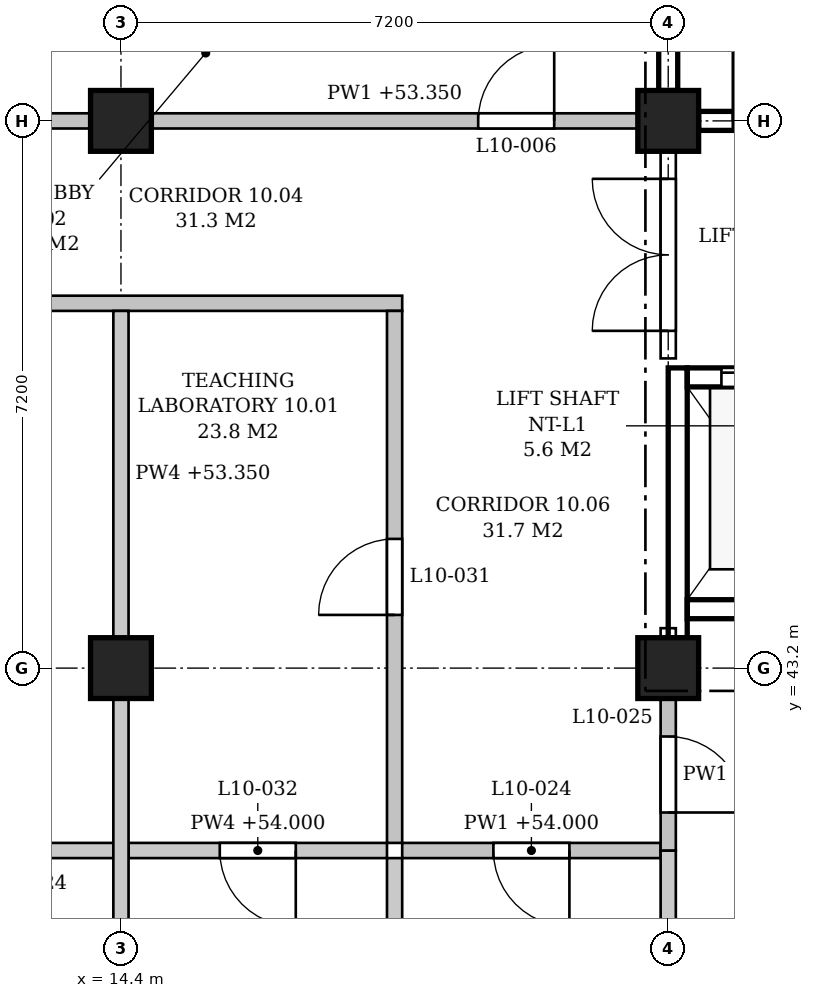
"""IFC4 building model, lengths in metres.
Left out: names, types, materials, properties, quantities, classifications, styles, units other than length and angle.
Written with IfcOpenShell. Run it as: python <this file> out.ifc"""

import sys

from ifc_helpers import new_model, si_unit, direction, frame, frame_2d, origin, origin_2d, place, context, subcontext, project, spatial, polyline, rectangle, outline, extrude, element, fill, save


model = new_model("IFC4")
c1 = context("Model", 3, precision=1e-05, world=origin(), true_north=direction((0.0, 1.0)))
c2 = subcontext(c1, "Body", "Model", "MODEL_VIEW")
j1 = project(units=[si_unit("LENGTHUNIT", "METRE"), si_unit("PLANEANGLEUNIT", "RADIAN")], contexts=[c1])
p1 = place(None, origin())
s1 = spatial("IfcSite", under=j1, at=p1, CompositionType="ELEMENT")
p2 = place(p1, origin())
s2 = spatial("IfcBuilding", under=s1, at=p2, CompositionType="ELEMENT")
p3 = place(p2, frame((0.0, 0.0, 49.8)))
s3 = spatial("IfcBuildingStorey", under=s2, at=p3, CompositionType="ELEMENT", Elevation=49.8)
for number, where, z_axis, x_axis in (
    (1, (14.4, 43.2, 0.0), (0.0, 0.0, 1.0), (1.0, 0.0, 0.0)),
    (2, (14.4, 50.4, 0.0), (0.0, 0.0, 1.0), (1.0, 0.0, 0.0)),
    (3, (21.6, 43.2, 0.0), (0.0, 0.0, 1.0), (1.0, 0.0, 0.0)),
    (4, (21.6, 50.4, 0.0), (0.0, 0.0, 1.0), (1.0, 0.0, 0.0)),
):
    element("IfcColumn", number, at=place(p3, frame(where, z_axis=z_axis, x_axis=x_axis)), inside=s3, PredefinedType="COLUMN", context=c2, shape_type="SweptSolid", body=[
        extrude(rectangle(XDim=0.8, YDim=0.8, at=origin_2d()), origin(), (0.0, 0.0, 1.0), 4.5),
    ])
p4 = place(p3, frame((22.0, 50.4, 0.0), z_axis=(0.0, 0.0, 1.0), x_axis=(1.0, 0.0, 0.0)))
e5 = element("IfcWall", 5, at=p4, inside=s3, PredefinedType="SHEAR", context=c2, shape_type="SweptSolid", body=[
    extrude(rectangle(XDim=6.4, YDim=0.25, at=frame_2d((3.2, 0.0))), origin(), (0.0, 0.0, 1.0), 3.55),
])
p5 = place(p4, frame((0.45, 0.0, 0.0)))
e6 = element("IfcOpeningElement", 6, at=p5, cuts=e5, PredefinedType="OPENING", context=c2, shape_type="SweptSolid", body=[
    extrude(rectangle(XDim=1.1, YDim=2.1, at=frame_2d((0.55, 1.05))), frame((0.0, 0.135, 0.0), z_axis=(0.0, -1.0, 0.0), x_axis=(1.0, 0.0, 0.0)), (0.0, 0.0, 1.0), 0.27),
])
p6 = place(p3, frame((21.6, 50.8, 0.0), z_axis=(0.0, 0.0, 1.0), x_axis=(0.0, 1.0, 0.0)))
e7 = element("IfcWall", 7, at=p6, inside=s3, PredefinedType="SHEAR", context=c2, shape_type="SweptSolid", body=[
    extrude(rectangle(XDim=6.4, YDim=0.25, at=frame_2d((3.2, 0.0))), origin(), (0.0, 0.0, 1.0), 3.55),
])
p7 = place(p3, frame((21.725, 43.6, -0.25), z_axis=(0.0, 0.0, 1.0), x_axis=(0.0, 1.0, 0.0)))
e8 = element("IfcWall", 8, at=p7, inside=s3, PredefinedType="SHEAR", context=c2, shape_type="SweptSolid", body=[
    extrude(rectangle(XDim=3.55, YDim=0.25, at=frame_2d((1.775, 0.0))), origin(), (0.0, 0.0, 1.0), 3.8),
])
p8 = place(p3, frame((21.85, 47.025, -0.25), z_axis=(0.0, 0.0, 1.0), x_axis=(1.0, 0.0, 0.0)))
e9 = element("IfcWall", 9, at=p8, inside=s3, PredefinedType="SHEAR", context=c2, shape_type="SweptSolid", body=[
    extrude(rectangle(XDim=2.0, YDim=0.25, at=frame_2d((1.0, 0.0))), origin(), (0.0, 0.0, 1.0), 4.45),
])
p9 = place(p8, frame((0.45, 0.0, 0.25)))
e10 = element("IfcOpeningElement", 10, at=p9, cuts=e9, PredefinedType="OPENING", context=c2, shape_type="SweptSolid", body=[
    extrude(rectangle(XDim=1.1, YDim=2.1, at=frame_2d((0.55, 1.05))), frame((0.0, 0.135, 0.0), z_axis=(0.0, -1.0, 0.0), x_axis=(1.0, 0.0, 0.0)), (0.0, 0.0, 1.0), 0.27),
])
p10 = place(p3, frame((21.85, 43.975, -0.25), z_axis=(0.0, 0.0, 1.0), x_axis=(1.0, 0.0, 0.0)))
e11 = element("IfcWall", 11, at=p10, inside=s3, PredefinedType="SHEAR", context=c2, shape_type="SweptSolid", body=[
    extrude(rectangle(XDim=2.0, YDim=0.25, at=frame_2d((1.0, 0.0))), origin(), (0.0, 0.0, 1.0), 4.45),
])
p11 = place(p3, frame((3.7, 40.8, 0.0), z_axis=(0.0, 0.0, 1.0), x_axis=(1.0, 0.0, 0.0)))
e12 = element("IfcWall", 12, at=p11, inside=s3, PredefinedType="PARTITIONING", context=c2, shape_type="SweptSolid", body=[
    extrude(outline(polyline([(0.0, 0.0), (10.6, 0.0), (10.6, 3.55), (10.475, 3.55), (10.475, 4.2), (3.725, 4.2), (3.725, 3.55), (3.275, 3.55), (3.275, 4.2), (0.0, 4.2), (0.0, 0.0)])), frame((0.0, 0.1, 0.0), z_axis=(0.0, -1.0, 0.0), x_axis=(1.0, 0.0, 0.0)), (0.0, 0.0, 1.0), 0.2),
])
p12 = place(p11, frame((1.25, 0.0, 0.0)))
e13 = element("IfcOpeningElement", 13, at=p12, cuts=e12, PredefinedType="OPENING", context=c2, shape_type="SweptSolid", body=[
    extrude(rectangle(XDim=1.0, YDim=2.1, at=frame_2d((0.5, 1.05))), frame((0.0, 0.11, 0.0), z_axis=(0.0, -1.0, 0.0), x_axis=(1.0, 0.0, 0.0)), (0.0, 0.0, 1.0), 0.22),
])
p13 = place(p11, frame((6.55, 0.0, 0.0)))
e14 = element("IfcOpeningElement", 14, at=p13, cuts=e12, PredefinedType="OPENING", context=c2, shape_type="SweptSolid", body=[
    extrude(rectangle(XDim=1.0, YDim=2.1, at=frame_2d((0.5, 1.05))), frame((0.0, 0.11, 0.0), z_axis=(0.0, -1.0, 0.0), x_axis=(1.0, 0.0, 0.0)), (0.0, 0.0, 1.0), 0.22),
])
p14 = place(p3, frame((14.5, 40.8, 0.0), z_axis=(0.0, 0.0, 1.0), x_axis=(1.0, 0.0, 0.0)))
e15 = element("IfcWall", 15, at=p14, inside=s3, PredefinedType="PARTITIONING", context=c2, shape_type="SweptSolid", body=[
    extrude(outline(polyline([(0.0, 0.0), (3.4, 0.0), (3.4, 4.2), (0.125, 4.2), (0.125, 3.55), (0.0, 3.55), (0.0, 0.0)])), frame((0.0, 0.1, 0.0), z_axis=(0.0, -1.0, 0.0), x_axis=(1.0, 0.0, 0.0)), (0.0, 0.0, 1.0), 0.2),
])
p15 = place(p14, frame((1.2, 0.0, 0.0)))
e16 = element("IfcOpeningElement", 16, at=p15, cuts=e15, PredefinedType="OPENING", context=c2, shape_type="SweptSolid", body=[
    extrude(rectangle(XDim=1.0, YDim=2.1, at=frame_2d((0.5, 1.05))), frame((0.0, 0.11, 0.0), z_axis=(0.0, -1.0, 0.0), x_axis=(1.0, 0.0, 0.0)), (0.0, 0.0, 1.0), 0.22),
])
p16 = place(p3, frame((18.1, 40.8, 0.0), z_axis=(0.0, 0.0, 1.0), x_axis=(1.0, 0.0, 0.0)))
e17 = element("IfcWall", 17, at=p16, inside=s3, PredefinedType="PARTITIONING", context=c2, shape_type="SweptSolid", body=[
    extrude(outline(polyline([(0.0, 0.0), (3.4, 0.0), (3.4, 3.55), (3.275, 3.55), (3.275, 4.2), (0.0, 4.2), (0.0, 0.0)])), frame((0.0, 0.1, 0.0), z_axis=(0.0, -1.0, 0.0), x_axis=(1.0, 0.0, 0.0)), (0.0, 0.0, 1.0), 0.2),
])
p17 = place(p16, frame((1.2, 0.0, 0.0)))
e18 = element("IfcOpeningElement", 18, at=p17, cuts=e17, PredefinedType="OPENING", context=c2, shape_type="SweptSolid", body=[
    extrude(rectangle(XDim=1.0, YDim=2.1, at=frame_2d((0.5, 1.05))), frame((0.0, 0.11, 0.0), z_axis=(0.0, -1.0, 0.0), x_axis=(1.0, 0.0, 0.0)), (0.0, 0.0, 1.0), 0.22),
])
p18 = place(p3, frame((3.5, 48.0, 0.0), z_axis=(0.0, 0.0, 1.0), x_axis=(1.0, 0.0, 0.0)))
e19 = element("IfcWall", 19, at=p18, inside=s3, PredefinedType="PARTITIONING", context=c2, shape_type="SweptSolid", body=[
    extrude(outline(polyline([(0.0, 0.0), (14.6, 0.0), (14.6, 4.2), (11.125, 4.2), (11.125, 3.55), (10.675, 3.55), (10.675, 4.2), (3.925, 4.2), (3.925, 3.55), (3.475, 3.55), (3.475, 4.2), (0.0, 4.2), (0.0, 0.0)])), frame((0.0, 0.1, 0.0), z_axis=(0.0, -1.0, 0.0), x_axis=(1.0, 0.0, 0.0)), (0.0, 0.0, 1.0), 0.2),
])
p19 = place(p18, frame((5.0, 0.0, 0.0)))
e20 = element("IfcOpeningElement", 20, at=p19, cuts=e19, PredefinedType="OPENING", context=c2, shape_type="SweptSolid", body=[
    extrude(rectangle(XDim=1.0, YDim=2.1, at=frame_2d((0.5, 1.05))), frame((0.0, 0.11, 0.0), z_axis=(0.0, -1.0, 0.0), x_axis=(1.0, 0.0, 0.0)), (0.0, 0.0, 1.0), 0.22),
])
p20 = place(p3, frame((7.6, 50.4, 0.0), z_axis=(0.0, 0.0, 1.0), x_axis=(1.0, 0.0, 0.0)))
e21 = element("IfcWall", 21, at=p20, inside=s3, PredefinedType="PARTITIONING", context=c2, shape_type="SweptSolid", body=[
    extrude(rectangle(XDim=6.4, YDim=0.2, at=frame_2d((3.2, 0.0))), origin(), (0.0, 0.0, 1.0), 3.55),
])
p21 = place(p20, frame((2.7, 0.0, 0.0)))
e22 = element("IfcOpeningElement", 22, at=p21, cuts=e21, PredefinedType="OPENING", context=c2, shape_type="SweptSolid", body=[
    extrude(rectangle(XDim=1.0, YDim=2.1, at=frame_2d((0.5, 1.05))), frame((0.0, 0.11, 0.0), z_axis=(0.0, -1.0, 0.0), x_axis=(1.0, 0.0, 0.0)), (0.0, 0.0, 1.0), 0.22),
])
p22 = place(p3, frame((14.8, 50.4, 0.0), z_axis=(0.0, 0.0, 1.0), x_axis=(1.0, 0.0, 0.0)))
e23 = element("IfcWall", 23, at=p22, inside=s3, PredefinedType="PARTITIONING", context=c2, shape_type="SweptSolid", body=[
    extrude(rectangle(XDim=6.4, YDim=0.2, at=frame_2d((3.2, 0.0))), origin(), (0.0, 0.0, 1.0), 3.55),
])
p23 = place(p22, frame((4.3, 0.0, 0.0)))
e24 = element("IfcOpeningElement", 24, at=p23, cuts=e23, PredefinedType="OPENING", context=c2, shape_type="SweptSolid", body=[
    extrude(rectangle(XDim=1.0, YDim=2.1, at=frame_2d((0.5, 1.05))), frame((0.0, 0.11, 0.0), z_axis=(0.0, -1.0, 0.0), x_axis=(1.0, 0.0, 0.0)), (0.0, 0.0, 1.0), 0.22),
])
p24 = place(p3, frame((14.4, 36.4, 0.0), z_axis=(0.0, 0.0, 1.0), x_axis=(0.0, 1.0, 0.0)))
e25 = element("IfcWall", 25, at=p24, inside=s3, PredefinedType="PARTITIONING", context=c2, shape_type="SweptSolid", body=[
    extrude(rectangle(XDim=6.4, YDim=0.2, at=frame_2d((3.2, 0.0))), origin(), (0.0, 0.0, 1.0), 3.55),
])
p25 = place(p3, frame((14.4, 43.6, 0.0), z_axis=(0.0, 0.0, 1.0), x_axis=(0.0, 1.0, 0.0)))
e26 = element("IfcWall", 26, at=p25, inside=s3, PredefinedType="PARTITIONING", context=c2, shape_type="SweptSolid", body=[
    extrude(rectangle(XDim=4.3, YDim=0.2, at=frame_2d((2.15, 0.0))), origin(), (0.0, 0.0, 1.0), 3.55),
])
p26 = place(p3, frame((18.0, 36.15, 0.0), z_axis=(0.0, 0.0, 1.0), x_axis=(0.0, 1.0, 0.0)))
e27 = element("IfcWall", 27, at=p26, inside=s3, PredefinedType="PARTITIONING", context=c2, shape_type="SweptSolid", body=[
    extrude(outline(polyline([(0.0, 0.0), (4.55, 0.0), (4.55, 4.2), (0.05, 4.2), (0.05, 3.6), (0.0, 3.6), (0.0, 0.0)])), frame((0.0, 0.1, 0.0), z_axis=(0.0, -1.0, 0.0), x_axis=(1.0, 0.0, 0.0)), (0.0, 0.0, 1.0), 0.2),
])
p27 = place(p3, frame((18.0, 40.9, 0.0), z_axis=(0.0, 0.0, 1.0), x_axis=(0.0, 1.0, 0.0)))
e28 = element("IfcWall", 28, at=p27, inside=s3, PredefinedType="PARTITIONING", context=c2, shape_type="SweptSolid", body=[
    extrude(outline(polyline([(0.0, 0.0), (7.0, 0.0), (7.0, 4.2), (2.525, 4.2), (2.525, 3.55), (2.075, 3.55), (2.075, 4.2), (0.0, 4.2), (0.0, 0.0)])), frame((0.0, 0.1, 0.0), z_axis=(0.0, -1.0, 0.0), x_axis=(1.0, 0.0, 0.0)), (0.0, 0.0, 1.0), 0.2),
])
p28 = place(p27, frame((3.0, 0.0, 0.0)))
e29 = element("IfcOpeningElement", 29, at=p28, cuts=e28, PredefinedType="OPENING", context=c2, shape_type="SweptSolid", body=[
    extrude(rectangle(XDim=1.0, YDim=2.1, at=frame_2d((0.5, 1.05))), frame((0.0, 0.11, 0.0), z_axis=(0.0, -1.0, 0.0), x_axis=(1.0, 0.0, 0.0)), (0.0, 0.0, 1.0), 0.22),
])
p29 = place(p3, frame((21.6, 36.4, 0.0), z_axis=(0.0, 0.0, 1.0), x_axis=(0.0, 1.0, 0.0)))
e30 = element("IfcWall", 30, at=p29, inside=s3, PredefinedType="PARTITIONING", context=c2, shape_type="SweptSolid", body=[
    extrude(rectangle(XDim=4.4, YDim=0.2, at=frame_2d((2.2, 0.0))), origin(), (0.0, 0.0, 1.0), 3.55),
])
p30 = place(p3, frame((21.6, 40.8, 0.0), z_axis=(0.0, 0.0, 1.0), x_axis=(0.0, 1.0, 0.0)))
e31 = element("IfcWall", 31, at=p30, inside=s3, PredefinedType="PARTITIONING", context=c2, shape_type="SweptSolid", body=[
    extrude(rectangle(XDim=2.0, YDim=0.2, at=frame_2d((1.0, 0.0))), origin(), (0.0, 0.0, 1.0), 3.55),
])
p31 = place(p30, frame((0.5, 0.0, 0.0)))
e32 = element("IfcOpeningElement", 32, at=p31, cuts=e31, PredefinedType="OPENING", context=c2, shape_type="SweptSolid", body=[
    extrude(rectangle(XDim=1.0, YDim=2.1, at=frame_2d((0.5, 1.05))), frame((0.0, 0.11, 0.0), z_axis=(0.0, -1.0, 0.0), x_axis=(1.0, 0.0, 0.0)), (0.0, 0.0, 1.0), 0.22),
])
p32 = place(p3, frame((21.6, 43.6, 0.0), z_axis=(0.0, 0.0, 1.0), x_axis=(0.0, 1.0, 0.0)))
e33 = element("IfcWall", 33, at=p32, inside=s3, PredefinedType="PARTITIONING", context=c2, shape_type="SweptSolid", body=[
    extrude(rectangle(XDim=0.125, YDim=0.2, at=frame_2d((0.062, 0.0))), origin(), (0.0, 0.0, 1.0), 3.55),
])
p33 = place(p3, frame((21.6, 47.275, 0.0), z_axis=(0.0, 0.0, 1.0), x_axis=(0.0, 1.0, 0.0)))
e34 = element("IfcWall", 34, at=p33, inside=s3, PredefinedType="PARTITIONING", context=c2, shape_type="SweptSolid", body=[
    extrude(rectangle(XDim=2.725, YDim=0.2, at=frame_2d((1.363, 0.0))), origin(), (0.0, 0.0, 1.0), 3.55),
])
p34 = place(p33, frame((0.363, 0.0, 0.0)))
e35 = element("IfcOpeningElement", 35, at=p34, cuts=e34, PredefinedType="OPENING", context=c2, shape_type="SweptSolid", body=[
    extrude(rectangle(XDim=2.0, YDim=2.4, at=frame_2d((1.0, 1.2))), frame((0.0, 0.11, 0.0), z_axis=(0.0, -1.0, 0.0), x_axis=(1.0, 0.0, 0.0)), (0.0, 0.0, 1.0), 0.22),
])
p35 = place(p5, origin())
e36 = element("IfcDoor", 36, at=p35, inside=s3, OperationType="SINGLE_SWING_LEFT", PredefinedType="DOOR", context=c2, shape_type="SweptSolid", body=[
    extrude(rectangle(XDim=1.1, YDim=2.1, at=frame_2d((0.55, 1.05))), frame((0.0, 0.025, 0.0), z_axis=(0.0, -1.0, 0.0), x_axis=(1.0, 0.0, 0.0)), (0.0, 0.0, 1.0), 0.05),
])
fill(e6, e36)
p36 = place(p9, origin())
e37 = element("IfcDoor", 37, at=p36, inside=s3, OperationType="SLIDING_TO_LEFT", PredefinedType="DOOR", context=c2, shape_type="SweptSolid", body=[
    extrude(rectangle(XDim=1.1, YDim=2.1, at=frame_2d((0.55, 1.05))), frame((0.0, 0.025, 0.0), z_axis=(0.0, -1.0, 0.0), x_axis=(1.0, 0.0, 0.0)), (0.0, 0.0, 1.0), 0.05),
])
fill(e10, e37)
p37 = place(p34, origin())
e38 = element("IfcDoor", 38, at=p37, inside=s3, OperationType="DOUBLE_DOOR_SINGLE_SWING", PredefinedType="DOOR", context=c2, shape_type="SweptSolid", body=[
    extrude(rectangle(XDim=2.0, YDim=2.4, at=frame_2d((1.0, 1.2))), frame((0.0, 0.025, 0.0), z_axis=(0.0, -1.0, 0.0), x_axis=(1.0, 0.0, 0.0)), (0.0, 0.0, 1.0), 0.05),
])
fill(e35, e38)
p38 = place(p23, origin())
e39 = element("IfcDoor", 39, at=p38, inside=s3, OperationType="SINGLE_SWING_RIGHT", PredefinedType="DOOR", context=c2, shape_type="SweptSolid", body=[
    extrude(rectangle(XDim=1.0, YDim=2.1, at=frame_2d((0.5, 1.05))), frame((0.0, 0.025, 0.0), z_axis=(0.0, -1.0, 0.0), x_axis=(1.0, 0.0, 0.0)), (0.0, 0.0, 1.0), 0.05),
])
fill(e24, e39)
p39 = place(p17, frame((1.0, 0.0, 0.0), z_axis=(0.0, 0.0, 1.0), x_axis=(-1.0, 0.0, 0.0)))
e40 = element("IfcDoor", 40, at=p39, inside=s3, OperationType="SINGLE_SWING_LEFT", PredefinedType="DOOR", context=c2, shape_type="SweptSolid", body=[
    extrude(rectangle(XDim=1.0, YDim=2.1, at=frame_2d((0.5, 1.05))), frame((0.0, 0.025, 0.0), z_axis=(0.0, -1.0, 0.0), x_axis=(1.0, 0.0, 0.0)), (0.0, 0.0, 1.0), 0.05),
])
fill(e18, e40)
p40 = place(p31, frame((1.0, 0.0, 0.0), z_axis=(0.0, 0.0, 1.0), x_axis=(-1.0, 0.0, 0.0)))
e41 = element("IfcDoor", 41, at=p40, inside=s3, OperationType="SINGLE_SWING_RIGHT", PredefinedType="DOOR", context=c2, shape_type="SweptSolid", body=[
    extrude(rectangle(XDim=1.0, YDim=2.1, at=frame_2d((0.5, 1.05))), frame((0.0, 0.025, 0.0), z_axis=(0.0, -1.0, 0.0), x_axis=(1.0, 0.0, 0.0)), (0.0, 0.0, 1.0), 0.05),
])
fill(e32, e41)
p41 = place(p28, origin())
e42 = element("IfcDoor", 42, at=p41, inside=s3, OperationType="SINGLE_SWING_LEFT", PredefinedType="DOOR", context=c2, shape_type="SweptSolid", body=[
    extrude(rectangle(XDim=1.0, YDim=2.1, at=frame_2d((0.5, 1.05))), frame((0.0, 0.025, 0.0), z_axis=(0.0, -1.0, 0.0), x_axis=(1.0, 0.0, 0.0)), (0.0, 0.0, 1.0), 0.05),
])
fill(e29, e42)
p42 = place(p15, frame((1.0, 0.0, 0.0), z_axis=(0.0, 0.0, 1.0), x_axis=(-1.0, 0.0, 0.0)))
e43 = element("IfcDoor", 43, at=p42, inside=s3, OperationType="SINGLE_SWING_LEFT", PredefinedType="DOOR", context=c2, shape_type="SweptSolid", body=[
    extrude(rectangle(XDim=1.0, YDim=2.1, at=frame_2d((0.5, 1.05))), frame((0.0, 0.025, 0.0), z_axis=(0.0, -1.0, 0.0), x_axis=(1.0, 0.0, 0.0)), (0.0, 0.0, 1.0), 0.05),
])
fill(e16, e43)
save(model, sys.argv[1])
